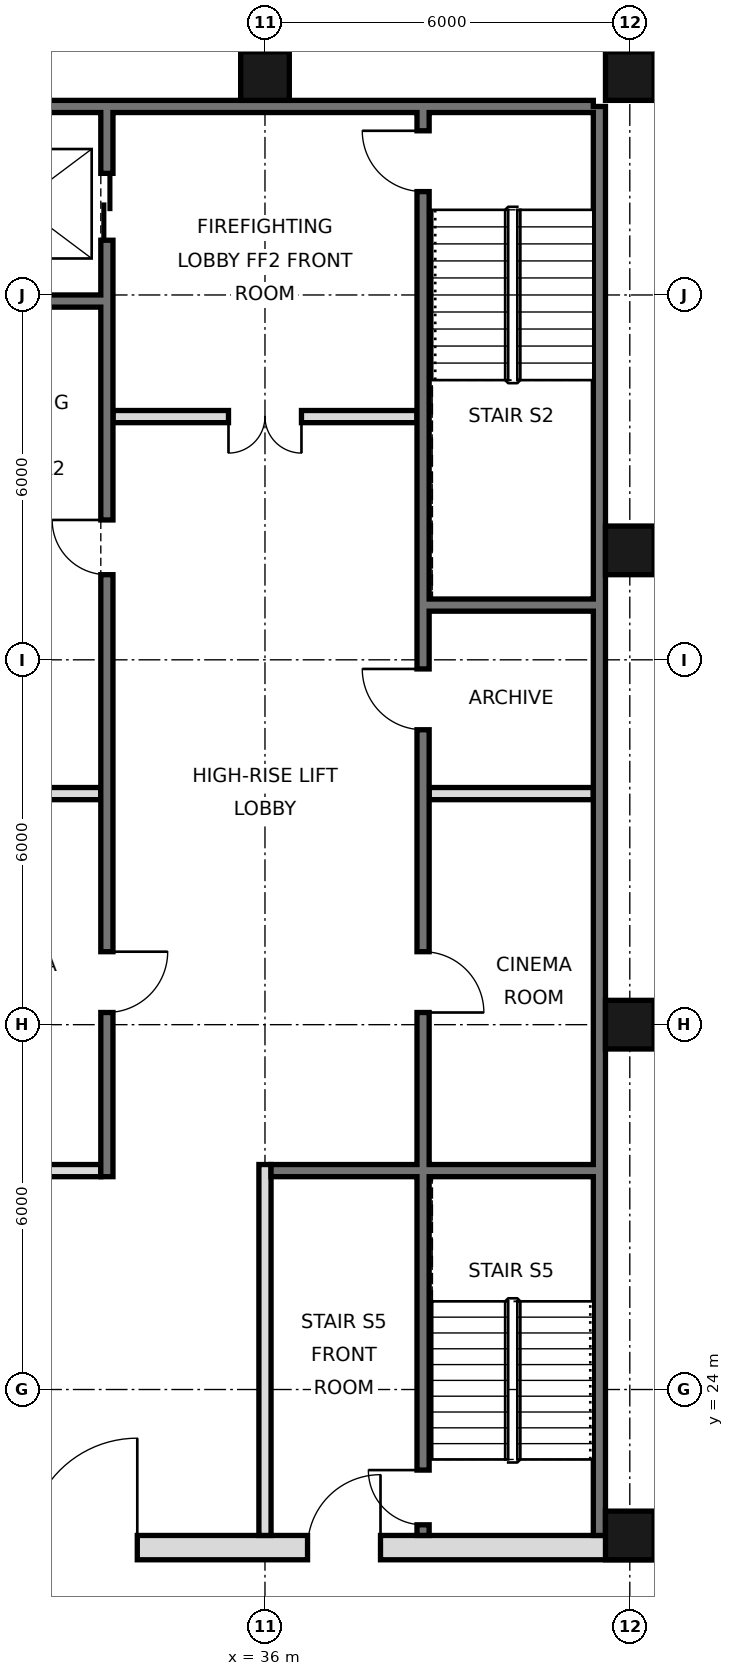
"""IFC4 building model, lengths in metres.
Left out: names, types, materials, properties, quantities, classifications, styles, units other than length and angle.
Written with IfcOpenShell. Run it as: python <this file> out.ifc"""

import sys

from ifc_helpers import new_model, si_unit, direction, frame, frame_2d, origin, origin_2d, place, context, subcontext, project, spatial, rectangle, hollow_rectangle, extrude, element, fill, save


model = new_model("IFC4")
c1 = context("Model", 3, precision=1e-05, world=origin(), true_north=direction((0.0, 1.0)))
c2 = subcontext(c1, "Body", "Model", "MODEL_VIEW")
j1 = project(units=[si_unit("LENGTHUNIT", "METRE"), si_unit("PLANEANGLEUNIT", "RADIAN")], contexts=[c1])
p1 = place(None, origin())
s1 = spatial("IfcSite", under=j1, at=p1, CompositionType="ELEMENT")
p2 = place(p1, origin())
s2 = spatial("IfcBuilding", under=s1, at=p2, CompositionType="ELEMENT")
p3 = place(p2, frame((0.0, 0.0, 119.6)))
s3 = spatial("IfcBuildingStorey", under=s2, at=p3, CompositionType="ELEMENT", Elevation=119.6)
for number, where, z_axis, x_axis in (
    (1, (36.0, 45.6, 0.0), (0.0, 0.0, 1.0), (1.0, 0.0, 0.0)),
    (2, (42.0, 21.6, 0.0), (0.0, 0.0, 1.0), (1.0, 0.0, 0.0)),
    (3, (42.0, 30.0, 0.0), (0.0, 0.0, 1.0), (1.0, 0.0, 0.0)),
    (4, (42.0, 37.8, 0.0), (0.0, 0.0, 1.0), (1.0, 0.0, 0.0)),
    (5, (42.0, 45.6, 0.0), (0.0, 0.0, 1.0), (1.0, 0.0, 0.0)),
):
    element("IfcColumn", number, at=place(p3, frame(where, z_axis=z_axis, x_axis=x_axis)), inside=s3, PredefinedType="COLUMN", context=c2, shape_type="SweptSolid", body=[
        extrude(hollow_rectangle(XDim=0.8, YDim=0.8, WallThickness=0.05, at=origin_2d()), origin(), (0.0, 0.0, 1.0), 3.6),
    ])
p4 = place(p3, frame((41.5, 21.6, 0.0), z_axis=(0.0, 0.0, 1.0), x_axis=(0.0, 1.0, 0.0)))
e6 = element("IfcWall", 6, at=p4, inside=s3, PredefinedType="SOLIDWALL", context=c2, shape_type="SweptSolid", body=[
    extrude(rectangle(XDim=23.5, YDim=0.2, at=frame_2d((11.75, 0.0))), origin(), (0.0, 0.0, 1.0), 3.42),
])
p5 = place(p3, frame((6.6, 45.1, 0.0), z_axis=(0.0, 0.0, 1.0), x_axis=(1.0, 0.0, 0.0)))
e7 = element("IfcWall", 7, at=p5, inside=s3, PredefinedType="SOLIDWALL", context=c2, shape_type="SweptSolid", body=[
    extrude(rectangle(XDim=34.8, YDim=0.2, at=frame_2d((17.4, 0.0))), origin(), (0.0, 0.0, 1.0), 3.42),
])
p6 = place(p3, frame((5.6, 21.4, 0.0), z_axis=(0.0, 0.0, 1.0), x_axis=(1.0, 0.0, 0.0)))
e8 = element("IfcWall", 8, at=p6, inside=s3, PredefinedType="SOLIDWALL", context=c2, shape_type="SweptSolid", body=[
    extrude(rectangle(XDim=36.8, YDim=0.4, at=frame_2d((18.4, 0.0))), origin(), (0.0, 0.0, 1.0), 3.42),
])
p7 = place(p6, frame((8.5, 0.0, 0.0)))
e9 = element("IfcOpeningElement", 9, at=p7, cuts=e8, PredefinedType="OPENING", context=c2, shape_type="SweptSolid", body=[
    extrude(rectangle(XDim=1.8, YDim=2.1, at=frame_2d((0.9, 1.05))), frame((0.0, 0.21, 0.0), z_axis=(0.0, -1.0, 0.0), x_axis=(1.0, 0.0, 0.0)), (0.0, 0.0, 1.0), 0.42),
])
p8 = place(p6, frame((17.5, 0.0, 0.0)))
e10 = element("IfcOpeningElement", 10, at=p8, cuts=e8, PredefinedType="OPENING", context=c2, shape_type="SweptSolid", body=[
    extrude(rectangle(XDim=1.8, YDim=2.1, at=frame_2d((0.9, 1.05))), frame((0.0, 0.21, 0.0), z_axis=(0.0, -1.0, 0.0), x_axis=(1.0, 0.0, 0.0)), (0.0, 0.0, 1.0), 0.42),
])
p9 = place(p6, frame((26.5, 0.0, 0.0)))
e11 = element("IfcOpeningElement", 11, at=p9, cuts=e8, PredefinedType="OPENING", context=c2, shape_type="SweptSolid", body=[
    extrude(rectangle(XDim=1.8, YDim=2.1, at=frame_2d((0.9, 1.05))), frame((0.0, 0.21, 0.0), z_axis=(0.0, -1.0, 0.0), x_axis=(1.0, 0.0, 0.0)), (0.0, 0.0, 1.0), 0.42),
])
p10 = place(p6, frame((4.5, 0.0, 0.0)))
e12 = element("IfcOpeningElement", 12, at=p10, cuts=e8, PredefinedType="OPENING", context=c2, shape_type="SweptSolid", body=[
    extrude(rectangle(XDim=1.2, YDim=2.1, at=frame_2d((0.6, 1.05))), frame((0.0, 0.21, 0.0), z_axis=(0.0, -1.0, 0.0), x_axis=(1.0, 0.0, 0.0)), (0.0, 0.0, 1.0), 0.42),
])
p11 = place(p6, frame((31.1, 0.0, 0.0)))
e13 = element("IfcOpeningElement", 13, at=p11, cuts=e8, PredefinedType="OPENING", context=c2, shape_type="SweptSolid", body=[
    extrude(rectangle(XDim=1.2, YDim=2.1, at=frame_2d((0.6, 1.05))), frame((0.0, 0.21, 0.0), z_axis=(0.0, -1.0, 0.0), x_axis=(1.0, 0.0, 0.0)), (0.0, 0.0, 1.0), 0.42),
])
p12 = place(p3, frame((33.4, 27.5, 0.0), z_axis=(0.0, 0.0, 1.0), x_axis=(0.0, 1.0, 0.0)))
e14 = element("IfcWall", 14, at=p12, inside=s3, PredefinedType="SOLIDWALL", context=c2, shape_type="SweptSolid", body=[
    extrude(rectangle(XDim=17.5, YDim=0.2, at=frame_2d((8.75, 0.0))), origin(), (0.0, 0.0, 1.0), 3.42),
])
p13 = place(p12, frame((15.4, 0.0, 0.0)))
e15 = element("IfcOpeningElement", 15, at=p13, cuts=e14, PredefinedType="OPENING", context=c2, shape_type="SweptSolid", body=[
    extrude(rectangle(XDim=1.1, YDim=2.1, at=frame_2d((0.55, 1.05))), frame((0.0, 0.11, 0.0), z_axis=(0.0, -1.0, 0.0), x_axis=(1.0, 0.0, 0.0)), (0.0, 0.0, 1.0), 0.22),
])
p14 = place(p12, frame((2.7, 0.0, 0.0)))
e16 = element("IfcOpeningElement", 16, at=p14, cuts=e14, PredefinedType="OPENING", context=c2, shape_type="SweptSolid", body=[
    extrude(rectangle(XDim=1.0, YDim=2.1, at=frame_2d((0.5, 1.05))), frame((0.0, 0.11, 0.0), z_axis=(0.0, -1.0, 0.0), x_axis=(1.0, 0.0, 0.0)), (0.0, 0.0, 1.0), 0.22),
])
p15 = place(p12, frame((9.9, 0.0, 0.0)))
e17 = element("IfcOpeningElement", 17, at=p15, cuts=e14, PredefinedType="OPENING", context=c2, shape_type="SweptSolid", body=[
    extrude(rectangle(XDim=0.9, YDim=2.1, at=frame_2d((0.45, 1.05))), frame((0.0, 0.11, 0.0), z_axis=(0.0, -1.0, 0.0), x_axis=(1.0, 0.0, 0.0)), (0.0, 0.0, 1.0), 0.22),
])
p16 = place(p3, frame((36.0, 21.6, 0.0), z_axis=(0.0, 0.0, 1.0), x_axis=(0.0, 1.0, 0.0)))
e18 = element("IfcWall", 18, at=p16, inside=s3, PredefinedType="PARTITIONING", context=c2, shape_type="SweptSolid", body=[
    extrude(rectangle(XDim=6.1, YDim=0.2, at=frame_2d((3.05, 0.0))), origin(), (0.0, 0.0, 1.0), 3.42),
])
p17 = place(p3, frame((38.6, 21.6, 0.0), z_axis=(0.0, 0.0, 1.0), x_axis=(0.0, 1.0, 0.0)))
e19 = element("IfcWall", 19, at=p17, inside=s3, PredefinedType="SOLIDWALL", context=c2, shape_type="SweptSolid", body=[
    extrude(rectangle(XDim=23.4, YDim=0.2, at=frame_2d((11.7, 0.0))), origin(), (0.0, 0.0, 1.0), 3.42),
])
p18 = place(p17, frame((8.6, 0.0, 0.0)))
e20 = element("IfcOpeningElement", 20, at=p18, cuts=e19, PredefinedType="OPENING", context=c2, shape_type="SweptSolid", body=[
    extrude(rectangle(XDim=1.0, YDim=2.1, at=frame_2d((0.5, 1.05))), frame((0.0, 0.11, 0.0), z_axis=(0.0, -1.0, 0.0), x_axis=(1.0, 0.0, 0.0)), (0.0, 0.0, 1.0), 0.22),
])
p19 = place(p17, frame((13.25, 0.0, 0.0)))
e21 = element("IfcOpeningElement", 21, at=p19, cuts=e19, PredefinedType="OPENING", context=c2, shape_type="SweptSolid", body=[
    extrude(rectangle(XDim=1.0, YDim=2.1, at=frame_2d((0.5, 1.05))), frame((0.0, 0.11, 0.0), z_axis=(0.0, -1.0, 0.0), x_axis=(1.0, 0.0, 0.0)), (0.0, 0.0, 1.0), 0.22),
])
p20 = place(p17, frame((22.1, 0.0, 0.0)))
e22 = element("IfcOpeningElement", 22, at=p20, cuts=e19, PredefinedType="OPENING", context=c2, shape_type="SweptSolid", body=[
    extrude(rectangle(XDim=1.0, YDim=2.1, at=frame_2d((0.5, 1.05))), frame((0.0, 0.11, 0.0), z_axis=(0.0, -1.0, 0.0), x_axis=(1.0, 0.0, 0.0)), (0.0, 0.0, 1.0), 0.22),
])
p21 = place(p17, frame((0.175, 0.0, 0.0)))
e23 = element("IfcOpeningElement", 23, at=p21, cuts=e19, PredefinedType="OPENING", context=c2, shape_type="SweptSolid", body=[
    extrude(rectangle(XDim=0.9, YDim=2.1, at=frame_2d((0.45, 1.05))), frame((0.0, 0.11, 0.0), z_axis=(0.0, -1.0, 0.0), x_axis=(1.0, 0.0, 0.0)), (0.0, 0.0, 1.0), 0.22),
])
p22 = place(p3, frame((30.6, 27.6, 0.0), z_axis=(0.0, 0.0, 1.0), x_axis=(1.0, 0.0, 0.0)))
e24 = element("IfcWall", 24, at=p22, inside=s3, PredefinedType="PARTITIONING", context=c2, shape_type="SweptSolid", body=[
    extrude(rectangle(XDim=2.7, YDim=0.2, at=frame_2d((1.35, 0.0))), origin(), (0.0, 0.0, 1.0), 3.42),
])
p23 = place(p3, frame((36.1, 27.6, 0.0), z_axis=(0.0, 0.0, 1.0), x_axis=(1.0, 0.0, 0.0)))
e25 = element("IfcWall", 25, at=p23, inside=s3, PredefinedType="SOLIDWALL", context=c2, shape_type="SweptSolid", body=[
    extrude(rectangle(XDim=5.3, YDim=0.2, at=frame_2d((2.65, 0.0))), origin(), (0.0, 0.0, 1.0), 3.42),
])
p24 = place(p3, frame((30.6, 33.8, 0.0), z_axis=(0.0, 0.0, 1.0), x_axis=(1.0, 0.0, 0.0)))
e26 = element("IfcWall", 26, at=p24, inside=s3, PredefinedType="SOLIDWALL", context=c2, shape_type="SweptSolid", body=[
    extrude(rectangle(XDim=2.7, YDim=0.2, at=frame_2d((1.35, 0.0))), origin(), (0.0, 0.0, 1.0), 3.42),
])
p25 = place(p3, frame((38.7, 33.8, 0.0), z_axis=(0.0, 0.0, 1.0), x_axis=(1.0, 0.0, 0.0)))
e27 = element("IfcWall", 27, at=p25, inside=s3, PredefinedType="PARTITIONING", context=c2, shape_type="SweptSolid", body=[
    extrude(rectangle(XDim=2.7, YDim=0.2, at=frame_2d((1.35, 0.0))), origin(), (0.0, 0.0, 1.0), 3.42),
])
p26 = place(p3, frame((38.7, 36.9, 0.0), z_axis=(0.0, 0.0, 1.0), x_axis=(1.0, 0.0, 0.0)))
e28 = element("IfcWall", 28, at=p26, inside=s3, PredefinedType="SOLIDWALL", context=c2, shape_type="SweptSolid", body=[
    extrude(rectangle(XDim=2.7, YDim=0.2, at=frame_2d((1.35, 0.0))), origin(), (0.0, 0.0, 1.0), 3.42),
])
p27 = place(p3, frame((33.5, 40.0, 0.0), z_axis=(0.0, 0.0, 1.0), x_axis=(1.0, 0.0, 0.0)))
e29 = element("IfcWall", 29, at=p27, inside=s3, PredefinedType="PARTITIONING", context=c2, shape_type="SweptSolid", body=[
    extrude(rectangle(XDim=5.0, YDim=0.2, at=frame_2d((2.5, 0.0))), origin(), (0.0, 0.0, 1.0), 3.42),
])
p28 = place(p27, frame((1.9, 0.0, 0.0)))
e30 = element("IfcOpeningElement", 30, at=p28, cuts=e29, PredefinedType="OPENING", context=c2, shape_type="SweptSolid", body=[
    extrude(rectangle(XDim=1.2, YDim=2.1, at=frame_2d((0.6, 1.05))), frame((0.0, 0.11, 0.0), z_axis=(0.0, -1.0, 0.0), x_axis=(1.0, 0.0, 0.0)), (0.0, 0.0, 1.0), 0.22),
])
p29 = place(p3, frame((30.6, 41.9, 0.0), z_axis=(0.0, 0.0, 1.0), x_axis=(1.0, 0.0, 0.0)))
e31 = element("IfcWall", 31, at=p29, inside=s3, PredefinedType="SOLIDWALL", context=c2, shape_type="SweptSolid", body=[
    extrude(rectangle(XDim=2.7, YDim=0.2, at=frame_2d((1.35, 0.0))), origin(), (0.0, 0.0, 1.0), 3.42),
])
p30 = place(p9, frame((1.8, 0.0, 0.0), z_axis=(0.0, 0.0, 1.0), x_axis=(-1.0, 0.0, 0.0)))
e32 = element("IfcDoor", 32, at=p30, inside=s3, OperationType="SINGLE_SWING_LEFT", PredefinedType="DOOR", context=c2, shape_type="SweptSolid", body=[
    extrude(rectangle(XDim=1.8, YDim=2.1, at=frame_2d((0.9, 1.05))), frame((0.0, 0.025, 0.0), z_axis=(0.0, -1.0, 0.0), x_axis=(1.0, 0.0, 0.0)), (0.0, 0.0, 1.0), 0.05),
])
fill(e11, e32)
p31 = place(p11, frame((1.2, 0.0, 0.0), z_axis=(0.0, 0.0, 1.0), x_axis=(-1.0, 0.0, 0.0)))
e33 = element("IfcDoor", 33, at=p31, inside=s3, OperationType="SINGLE_SWING_LEFT", PredefinedType="DOOR", context=c2, shape_type="SweptSolid", body=[
    extrude(rectangle(XDim=1.2, YDim=2.1, at=frame_2d((0.6, 1.05))), frame((0.0, 0.025, 0.0), z_axis=(0.0, -1.0, 0.0), x_axis=(1.0, 0.0, 0.0)), (0.0, 0.0, 1.0), 0.05),
])
fill(e13, e33)
p32 = place(p28, frame((1.2, 0.0, 0.0), z_axis=(0.0, 0.0, 1.0), x_axis=(-1.0, 0.0, 0.0)))
e34 = element("IfcDoor", 34, at=p32, inside=s3, OperationType="DOUBLE_DOOR_SINGLE_SWING", PredefinedType="DOOR", context=c2, shape_type="SweptSolid", body=[
    extrude(rectangle(XDim=1.2, YDim=2.1, at=frame_2d((0.6, 1.05))), frame((0.0, 0.025, 0.0), z_axis=(0.0, -1.0, 0.0), x_axis=(1.0, 0.0, 0.0)), (0.0, 0.0, 1.0), 0.05),
])
fill(e30, e34)
p33 = place(p13, origin())
e35 = element("IfcDoor", 35, at=p33, inside=s3, OperationType="DOUBLE_DOOR_SLIDING", PredefinedType="DOOR", context=c2, shape_type="SweptSolid", body=[
    extrude(rectangle(XDim=1.1, YDim=2.1, at=frame_2d((0.55, 1.05))), frame((0.0, 0.025, 0.0), z_axis=(0.0, -1.0, 0.0), x_axis=(1.0, 0.0, 0.0)), (0.0, 0.0, 1.0), 0.05),
])
fill(e15, e35)
p34 = place(p18, frame((1.0, 0.0, 0.0), z_axis=(0.0, 0.0, 1.0), x_axis=(-1.0, 0.0, 0.0)))
e36 = element("IfcDoor", 36, at=p34, inside=s3, OperationType="SINGLE_SWING_RIGHT", PredefinedType="DOOR", context=c2, shape_type="SweptSolid", body=[
    extrude(rectangle(XDim=1.0, YDim=2.1, at=frame_2d((0.5, 1.05))), frame((0.0, 0.025, 0.0), z_axis=(0.0, -1.0, 0.0), x_axis=(1.0, 0.0, 0.0)), (0.0, 0.0, 1.0), 0.05),
])
fill(e20, e36)
p35 = place(p19, frame((1.0, 0.0, 0.0), z_axis=(0.0, 0.0, 1.0), x_axis=(-1.0, 0.0, 0.0)))
e37 = element("IfcDoor", 37, at=p35, inside=s3, OperationType="SINGLE_SWING_LEFT", PredefinedType="DOOR", context=c2, shape_type="SweptSolid", body=[
    extrude(rectangle(XDim=1.0, YDim=2.1, at=frame_2d((0.5, 1.05))), frame((0.0, 0.025, 0.0), z_axis=(0.0, -1.0, 0.0), x_axis=(1.0, 0.0, 0.0)), (0.0, 0.0, 1.0), 0.05),
])
fill(e21, e37)
p36 = place(p14, origin())
e38 = element("IfcDoor", 38, at=p36, inside=s3, OperationType="SINGLE_SWING_RIGHT", PredefinedType="DOOR", context=c2, shape_type="SweptSolid", body=[
    extrude(rectangle(XDim=1.0, YDim=2.1, at=frame_2d((0.5, 1.05))), frame((0.0, 0.025, 0.0), z_axis=(0.0, -1.0, 0.0), x_axis=(1.0, 0.0, 0.0)), (0.0, 0.0, 1.0), 0.05),
])
fill(e16, e38)
p37 = place(p20, frame((1.0, 0.0, 0.0), z_axis=(0.0, 0.0, 1.0), x_axis=(-1.0, 0.0, 0.0)))
e39 = element("IfcDoor", 39, at=p37, inside=s3, OperationType="SINGLE_SWING_LEFT", PredefinedType="DOOR", context=c2, shape_type="SweptSolid", body=[
    extrude(rectangle(XDim=1.0, YDim=2.1, at=frame_2d((0.5, 1.05))), frame((0.0, 0.025, 0.0), z_axis=(0.0, -1.0, 0.0), x_axis=(1.0, 0.0, 0.0)), (0.0, 0.0, 1.0), 0.05),
])
fill(e22, e39)
p38 = place(p21, frame((0.9, 0.0, 0.0), z_axis=(0.0, 0.0, 1.0), x_axis=(-1.0, 0.0, 0.0)))
e40 = element("IfcDoor", 40, at=p38, inside=s3, OperationType="SINGLE_SWING_LEFT", PredefinedType="DOOR", context=c2, shape_type="SweptSolid", body=[
    extrude(rectangle(XDim=0.9, YDim=2.1, at=frame_2d((0.45, 1.05))), frame((0.0, 0.025, 0.0), z_axis=(0.0, -1.0, 0.0), x_axis=(1.0, 0.0, 0.0)), (0.0, 0.0, 1.0), 0.05),
])
fill(e23, e40)
p39 = place(p15, frame((0.9, 0.0, 0.0), z_axis=(0.0, 0.0, 1.0), x_axis=(-1.0, 0.0, 0.0)))
e41 = element("IfcDoor", 41, at=p39, inside=s3, OperationType="SINGLE_SWING_LEFT", PredefinedType="DOOR", context=c2, shape_type="SweptSolid", body=[
    extrude(rectangle(XDim=0.9, YDim=2.1, at=frame_2d((0.45, 1.05))), frame((0.0, 0.025, 0.0), z_axis=(0.0, -1.0, 0.0), x_axis=(1.0, 0.0, 0.0)), (0.0, 0.0, 1.0), 0.05),
])
fill(e17, e41)
save(model, sys.argv[1])
